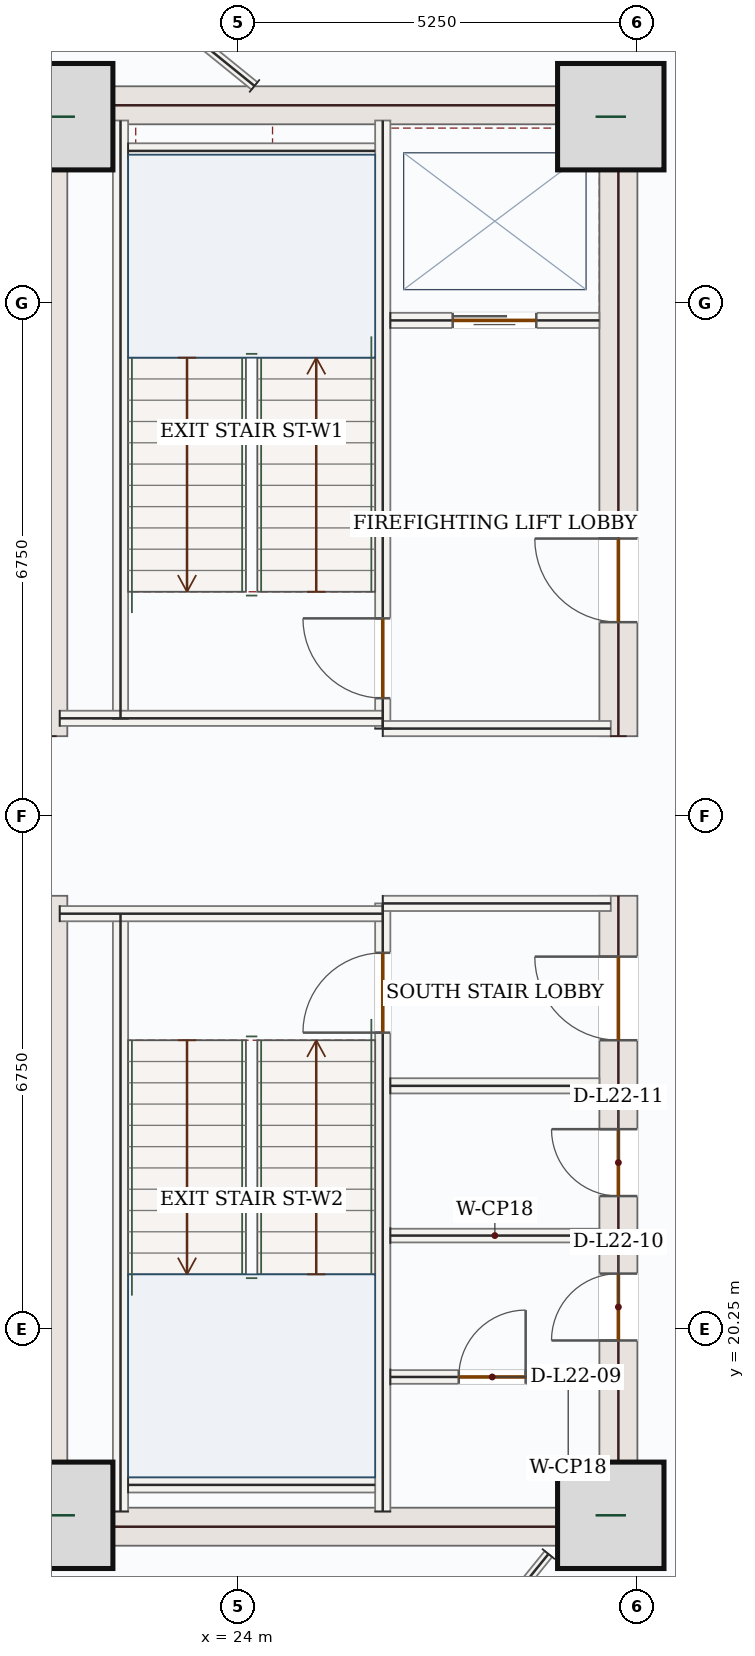
"""IFC4 building model, lengths in metres.
Left out: names, types, materials, properties, quantities, classifications, styles, units other than length and angle.
Written with IfcOpenShell. Run it as: python <this file> out.ifc"""

import sys

from ifc_helpers import new_model, si_unit, direction, frame, frame_2d, origin, origin_2d, place, context, subcontext, project, spatial, rectangle, extrude, source, transform, mapped, element, fill, save


model = new_model("IFC4")
c1 = context("Model", 3, precision=1e-05, world=origin(), true_north=direction((0.0, 1.0)))
c2 = subcontext(c1, "Body", "Model", "MODEL_VIEW")
j1 = project(units=[si_unit("LENGTHUNIT", "METRE"), si_unit("PLANEANGLEUNIT", "RADIAN")], contexts=[c1])
p1 = place(None, origin())
s1 = spatial("IfcSite", under=j1, at=p1, CompositionType="ELEMENT")
p2 = place(p1, origin())
s2 = spatial("IfcBuilding", under=s1, at=p2, CompositionType="ELEMENT")
p3 = place(p2, frame((0.0, 0.0, 100.5)))
s3 = spatial("IfcBuildingStorey", under=s2, at=p3, CompositionType="ELEMENT", Elevation=100.5)
m1 = source(origin(), c2, "Body", "SweptSolid", [
    extrude(rectangle(XDim=8.55, YDim=0.5, at=frame_2d((4.275, 0.0))), origin(), (0.0, 0.0, 1.0), 3.95),
])
for number, where, z_axis, x_axis in (
    (1, (21.5, 17.4, 0.0), (0.0, 0.0, 1.0), (0.0, 1.0, 0.0)),
    (2, (21.5, 28.05, 0.0), (0.0, 0.0, 1.0), (0.0, 1.0, 0.0)),
):
    element("IfcWall", number, at=place(p3, frame(where, z_axis=z_axis, x_axis=x_axis)), inside=s3, PredefinedType="SHEAR", context=c2, shape_type="MappedRepresentation", body=[
        mapped(m1, transform((0.0, 0.0, 0.0), x_axis=(1.0, 0.0, 0.0), y_axis=(0.0, 1.0, 0.0), z_axis=(0.0, 0.0, 1.0), scale=1.0)),
    ])
p4 = place(p3, frame((29.0, 17.4, 0.0), z_axis=(0.0, 0.0, 1.0), x_axis=(0.0, 1.0, 0.0)))
e3 = element("IfcWall", 3, at=p4, inside=s3, PredefinedType="SHEAR", context=c2, shape_type="SweptSolid", body=[
    extrude(rectangle(XDim=8.55, YDim=0.5, at=frame_2d((4.275, 0.0))), origin(), (0.0, 0.0, 1.0), 3.95),
])
p5 = place(p4, frame((6.65, 0.0, 0.0)))
e4 = element("IfcOpeningElement", 4, at=p5, cuts=e3, PredefinedType="OPENING", context=c2, shape_type="SweptSolid", body=[
    extrude(rectangle(XDim=1.1, YDim=2.2, at=frame_2d((0.55, 1.1))), frame((0.0, 0.26, 0.0), z_axis=(0.0, -1.0, 0.0), x_axis=(1.0, 0.0, 0.0)), (0.0, 0.0, 1.0), 0.52),
])
p6 = place(p4, frame((2.7, 0.0, 0.0)))
e5 = element("IfcOpeningElement", 5, at=p6, cuts=e3, PredefinedType="OPENING", context=c2, shape_type="SweptSolid", body=[
    extrude(rectangle(XDim=0.88, YDim=2.1, at=frame_2d((0.44, 1.05))), frame((0.0, 0.26, 0.0), z_axis=(0.0, -1.0, 0.0), x_axis=(1.0, 0.0, 0.0)), (0.0, 0.0, 1.0), 0.52),
])
p7 = place(p4, frame((4.6, 0.0, 0.0)))
e6 = element("IfcOpeningElement", 6, at=p7, cuts=e3, PredefinedType="OPENING", context=c2, shape_type="SweptSolid", body=[
    extrude(rectangle(XDim=0.88, YDim=2.1, at=frame_2d((0.44, 1.05))), frame((0.0, 0.26, 0.0), z_axis=(0.0, -1.0, 0.0), x_axis=(1.0, 0.0, 0.0)), (0.0, 0.0, 1.0), 0.52),
])
p8 = place(p3, frame((29.0, 28.05, 0.0), z_axis=(0.0, 0.0, 1.0), x_axis=(0.0, 1.0, 0.0)))
e7 = element("IfcWall", 7, at=p8, inside=s3, PredefinedType="SHEAR", context=c2, shape_type="SweptSolid", body=[
    extrude(rectangle(XDim=8.55, YDim=0.5, at=frame_2d((4.275, 0.0))), origin(), (0.0, 0.0, 1.0), 3.95),
])
p9 = place(p8, frame((1.5, 0.0, 0.0)))
e8 = element("IfcOpeningElement", 8, at=p9, cuts=e7, PredefinedType="OPENING", context=c2, shape_type="SweptSolid", body=[
    extrude(rectangle(XDim=1.1, YDim=2.2, at=frame_2d((0.55, 1.1))), frame((0.0, 0.26, 0.0), z_axis=(0.0, -1.0, 0.0), x_axis=(1.0, 0.0, 0.0)), (0.0, 0.0, 1.0), 0.52),
])
m2 = source(origin(), c2, "Body", "SweptSolid", [
    extrude(rectangle(XDim=7.0, YDim=0.5, at=frame_2d((3.5, 0.0))), origin(), (0.0, 0.0, 1.0), 3.95),
])
for number, where, z_axis, x_axis in (
    (9, (21.75, 17.65, 0.0), (0.0, 0.0, 1.0), (1.0, 0.0, 0.0)),
    (10, (21.75, 36.35, 0.0), (0.0, 0.0, 1.0), (1.0, 0.0, 0.0)),
):
    element("IfcWall", number, at=place(p3, frame(where, z_axis=z_axis, x_axis=x_axis)), inside=s3, PredefinedType="SHEAR", context=c2, shape_type="MappedRepresentation", body=[
        mapped(m2, transform((0.0, 0.0, 0.0), x_axis=(1.0, 0.0, 0.0), y_axis=(0.0, 1.0, 0.0), z_axis=(0.0, 0.0, 1.0), scale=1.0)),
    ])
m3 = source(origin(), c2, "Body", "SweptSolid", [
    extrude(rectangle(XDim=1.4, YDim=1.4, at=origin_2d()), origin(), (0.0, 0.0, 1.0), 4.2),
])
for number, where, z_axis, x_axis in (
    (11, (21.65, 17.8, 0.0), (0.0, 0.0, 1.0), (1.0, 0.0, 0.0)),
    (12, (28.9, 17.8, 0.0), (0.0, 0.0, 1.0), (1.0, 0.0, 0.0)),
    (13, (21.65, 36.2, 0.0), (0.0, 0.0, 1.0), (1.0, 0.0, 0.0)),
    (14, (28.9, 36.2, 0.0), (0.0, 0.0, 1.0), (1.0, 0.0, 0.0)),
):
    element("IfcColumn", number, at=place(p3, frame(where, z_axis=z_axis, x_axis=x_axis)), inside=s3, PredefinedType="COLUMN", context=c2, shape_type="MappedRepresentation", body=[
        mapped(m3, transform((0.0, 0.0, 0.0), x_axis=(1.0, 0.0, 0.0), y_axis=(0.0, 1.0, 0.0), z_axis=(0.0, 0.0, 1.0), scale=1.0)),
    ])
p10 = place(p3, frame((18.94, 35.542, 0.0), z_axis=(0.0, 0.0, 1.0), x_axis=(0.707106781187, 0.707106781187, 0.0)))
e15 = element("IfcWall", 15, at=p10, inside=s3, PredefinedType="SOLIDWALL", context=c2, shape_type="SweptSolid", body=[
    extrude(rectangle(XDim=5.258, YDim=0.32, at=frame_2d((2.629, 0.0))), origin(), (0.0, 0.0, 1.0), 3.95),
])
p11 = place(p10, frame((1.429, 0.0, 0.85)))
e16 = element("IfcOpeningElement", 16, at=p11, cuts=e15, PredefinedType="OPENING", context=c2, shape_type="SweptSolid", body=[
    extrude(rectangle(XDim=2.4, YDim=1.8, at=frame_2d((1.2, 0.9))), frame((0.0, 0.17, 0.0), z_axis=(0.0, -1.0, 0.0), x_axis=(1.0, 0.0, 0.0)), (0.0, 0.0, 1.0), 0.34),
])
m4 = source(origin(), c2, "Body", "SweptSolid", [
    extrude(rectangle(XDim=5.258, YDim=0.32, at=frame_2d((2.629, 0.0))), origin(), (0.0, 0.0, 1.0), 3.95),
])
p12 = place(p3, frame((22.658, 14.74, 0.0), z_axis=(0.0, 0.0, 1.0), x_axis=(-0.707106781187, 0.707106781187, 0.0)))
e17 = element("IfcWall", 17, at=p12, inside=s3, PredefinedType="SOLIDWALL", context=c2, shape_type="MappedRepresentation", body=[
    mapped(m4, transform((0.0, 0.0, 0.0), x_axis=(1.0, 0.0, 0.0), y_axis=(0.0, 1.0, 0.0), z_axis=(0.0, 0.0, 1.0), scale=1.0)),
])
m5 = source(origin(), c2, "Body", "SweptSolid", [
    extrude(rectangle(XDim=7.87, YDim=0.2, at=frame_2d((3.935, 0.0))), origin(), (0.0, 0.0, 1.0), 3.95),
])
for number, where, z_axis, x_axis in (
    (18, (22.45, 17.85, 0.0), (0.0, 0.0, 1.0), (0.0, 1.0, 0.0)),
    (19, (22.45, 28.28, 0.0), (0.0, 0.0, 1.0), (0.0, 1.0, 0.0)),
):
    element("IfcWall", number, at=place(p3, frame(where, z_axis=z_axis, x_axis=x_axis)), inside=s3, PredefinedType="SOLIDWALL", context=c2, shape_type="MappedRepresentation", body=[
        mapped(m5, transform((0.0, 0.0, 0.0), x_axis=(1.0, 0.0, 0.0), y_axis=(0.0, 1.0, 0.0), z_axis=(0.0, 0.0, 1.0), scale=1.0)),
    ])
p13 = place(p3, frame((25.9, 17.85, 0.0), z_axis=(0.0, 0.0, 1.0), x_axis=(0.0, 1.0, 0.0)))
e20 = element("IfcWall", 20, at=p13, inside=s3, PredefinedType="SOLIDWALL", context=c2, shape_type="SweptSolid", body=[
    extrude(rectangle(XDim=8.0, YDim=0.2, at=frame_2d((4.0, 0.0))), origin(), (0.0, 0.0, 1.0), 3.95),
])
p14 = place(p13, frame((6.3, 0.0, 0.0)))
e21 = element("IfcOpeningElement", 21, at=p14, cuts=e20, PredefinedType="OPENING", context=c2, shape_type="SweptSolid", body=[
    extrude(rectangle(XDim=1.05, YDim=2.15, at=frame_2d((0.525, 1.075))), frame((0.0, 0.11, 0.0), z_axis=(0.0, -1.0, 0.0), x_axis=(1.0, 0.0, 0.0)), (0.0, 0.0, 1.0), 0.22),
])
p15 = place(p3, frame((25.9, 28.15, 0.0), z_axis=(0.0, 0.0, 1.0), x_axis=(0.0, 1.0, 0.0)))
e22 = element("IfcWall", 22, at=p15, inside=s3, PredefinedType="SOLIDWALL", context=c2, shape_type="SweptSolid", body=[
    extrude(rectangle(XDim=8.0, YDim=0.2, at=frame_2d((4.0, 0.0))), origin(), (0.0, 0.0, 1.0), 3.95),
])
p16 = place(p15, frame((0.4, 0.0, 0.0)))
e23 = element("IfcOpeningElement", 23, at=p16, cuts=e22, PredefinedType="OPENING", context=c2, shape_type="SweptSolid", body=[
    extrude(rectangle(XDim=1.05, YDim=2.15, at=frame_2d((0.525, 1.075))), frame((0.0, 0.11, 0.0), z_axis=(0.0, -1.0, 0.0), x_axis=(1.0, 0.0, 0.0)), (0.0, 0.0, 1.0), 0.22),
])
m6 = source(origin(), c2, "Body", "SweptSolid", [
    extrude(rectangle(XDim=4.25, YDim=0.2, at=frame_2d((2.125, 0.0))), origin(), (0.0, 0.0, 1.0), 3.95),
])
p17 = place(p3, frame((21.65, 25.715, 0.0), z_axis=(0.0, 0.0, 1.0), x_axis=(1.0, 0.0, 0.0)))
e24 = element("IfcWall", 24, at=p17, inside=s3, PredefinedType="SOLIDWALL", context=c2, shape_type="MappedRepresentation", body=[
    mapped(m6, transform((0.0, 0.0, 0.0), x_axis=(1.0, 0.0, 0.0), y_axis=(0.0, 1.0, 0.0), z_axis=(0.0, 0.0, 1.0), scale=1.0)),
])
m7 = source(origin(), c2, "Body", "SweptSolid", [
    extrude(rectangle(XDim=3.0, YDim=0.2, at=frame_2d((1.5, 0.0))), origin(), (0.0, 0.0, 1.0), 3.95),
])
p18 = place(p3, frame((25.9, 25.85, 0.0), z_axis=(0.0, 0.0, 1.0), x_axis=(1.0, 0.0, 0.0)))
e25 = element("IfcWall", 25, at=p18, inside=s3, PredefinedType="SOLIDWALL", context=c2, shape_type="MappedRepresentation", body=[
    mapped(m7, transform((0.0, 0.0, 0.0), x_axis=(1.0, 0.0, 0.0), y_axis=(0.0, 1.0, 0.0), z_axis=(0.0, 0.0, 1.0), scale=1.0)),
])
p19 = place(p3, frame((21.65, 28.285, 0.0), z_axis=(0.0, 0.0, 1.0), x_axis=(1.0, 0.0, 0.0)))
e26 = element("IfcWall", 26, at=p19, inside=s3, PredefinedType="SOLIDWALL", context=c2, shape_type="MappedRepresentation", body=[
    mapped(m6, transform((0.0, 0.0, 0.0), x_axis=(1.0, 0.0, 0.0), y_axis=(0.0, 1.0, 0.0), z_axis=(0.0, 0.0, 1.0), scale=1.0)),
])
p20 = place(p3, frame((25.9, 28.15, 0.0), z_axis=(0.0, 0.0, 1.0), x_axis=(1.0, 0.0, 0.0)))
e27 = element("IfcWall", 27, at=p20, inside=s3, PredefinedType="SOLIDWALL", context=c2, shape_type="MappedRepresentation", body=[
    mapped(m7, transform((0.0, 0.0, 0.0), x_axis=(1.0, 0.0, 0.0), y_axis=(0.0, 1.0, 0.0), z_axis=(0.0, 0.0, 1.0), scale=1.0)),
])
m8 = source(origin(), c2, "Body", "SweptSolid", [
    extrude(rectangle(XDim=3.25, YDim=0.2, at=frame_2d((1.625, 0.0))), origin(), (0.0, 0.0, 1.0), 3.95),
])
for number, where, z_axis, x_axis in (
    (28, (22.55, 35.75, 0.0), (0.0, 0.0, 1.0), (1.0, 0.0, 0.0)),
    (29, (22.55, 18.2, 0.0), (0.0, 0.0, 1.0), (1.0, 0.0, 0.0)),
):
    element("IfcWall", number, at=place(p3, frame(where, z_axis=z_axis, x_axis=x_axis)), inside=s3, PredefinedType="SOLIDWALL", context=c2, shape_type="MappedRepresentation", body=[
        mapped(m8, transform((0.0, 0.0, 0.0), x_axis=(1.0, 0.0, 0.0), y_axis=(0.0, 1.0, 0.0), z_axis=(0.0, 0.0, 1.0), scale=1.0)),
    ])
p21 = place(p3, frame((26.0, 33.52, 0.0), z_axis=(0.0, 0.0, 1.0), x_axis=(1.0, 0.0, 0.0)))
e30 = element("IfcWall", 30, at=p21, inside=s3, PredefinedType="SOLIDWALL", context=c2, shape_type="SweptSolid", body=[
    extrude(rectangle(XDim=2.75, YDim=0.2, at=frame_2d((1.375, 0.0))), origin(), (0.0, 0.0, 1.0), 3.95),
])
p22 = place(p21, frame((0.82, 0.0, 0.0)))
e31 = element("IfcOpeningElement", 31, at=p22, cuts=e30, PredefinedType="OPENING", context=c2, shape_type="SweptSolid", body=[
    extrude(rectangle(XDim=1.1, YDim=2.15, at=frame_2d((0.55, 1.075))), frame((0.0, 0.11, 0.0), z_axis=(0.0, -1.0, 0.0), x_axis=(1.0, 0.0, 0.0)), (0.0, 0.0, 1.0), 0.22),
])
m9 = source(origin(), c2, "Body", "SweptSolid", [
    extrude(rectangle(XDim=2.75, YDim=0.2, at=frame_2d((1.375, 0.0))), origin(), (0.0, 0.0, 1.0), 3.95),
])
p23 = place(p3, frame((26.0, 23.45, 0.0), z_axis=(0.0, 0.0, 1.0), x_axis=(1.0, 0.0, 0.0)))
e32 = element("IfcWall", 32, at=p23, inside=s3, PredefinedType="SOLIDWALL", context=c2, shape_type="MappedRepresentation", body=[
    mapped(m9, transform((0.0, 0.0, 0.0), x_axis=(1.0, 0.0, 0.0), y_axis=(0.0, 1.0, 0.0), z_axis=(0.0, 0.0, 1.0), scale=1.0)),
])
p24 = place(p3, frame((26.0, 19.62, 0.0), z_axis=(0.0, 0.0, 1.0), x_axis=(1.0, 0.0, 0.0)))
e33 = element("IfcWall", 33, at=p24, inside=s3, PredefinedType="PARTITIONING", context=c2, shape_type="SweptSolid", body=[
    extrude(rectangle(XDim=2.75, YDim=0.18, at=frame_2d((1.375, 0.0))), origin(), (0.0, 0.0, 1.0), 3.95),
])
p25 = place(p24, frame((0.9, 0.0, 0.0)))
e34 = element("IfcOpeningElement", 34, at=p25, cuts=e33, PredefinedType="OPENING", context=c2, shape_type="SweptSolid", body=[
    extrude(rectangle(XDim=0.88, YDim=2.1, at=frame_2d((0.44, 1.05))), frame((0.0, 0.1, 0.0), z_axis=(0.0, -1.0, 0.0), x_axis=(1.0, 0.0, 0.0)), (0.0, 0.0, 1.0), 0.2),
])
m10 = source(origin(), c2, "Body", "SweptSolid", [
    extrude(rectangle(XDim=2.75, YDim=0.18, at=frame_2d((1.375, 0.0))), origin(), (0.0, 0.0, 1.0), 3.95),
])
p26 = place(p3, frame((26.0, 21.48, 0.0), z_axis=(0.0, 0.0, 1.0), x_axis=(1.0, 0.0, 0.0)))
e35 = element("IfcWall", 35, at=p26, inside=s3, PredefinedType="PARTITIONING", context=c2, shape_type="MappedRepresentation", body=[
    mapped(m10, transform((0.0, 0.0, 0.0), x_axis=(1.0, 0.0, 0.0), y_axis=(0.0, 1.0, 0.0), z_axis=(0.0, 0.0, 1.0), scale=1.0)),
])
m11 = source(origin(), c2, "Body", "SweptSolid", [
    extrude(rectangle(XDim=2.827, YDim=0.125, at=frame_2d((1.414, 0.0))), origin(), (0.0, 0.0, 1.0), 3.95),
])
p27 = place(p3, frame((24.213, 36.605, 0.0), z_axis=(0.0, 0.0, 1.0), x_axis=(-0.776808269954, 0.62973717671, 0.0)))
e36 = element("IfcWall", 36, at=p27, inside=s3, PredefinedType="PARTITIONING", context=c2, shape_type="MappedRepresentation", body=[
    mapped(m11, transform((0.0, 0.0, 0.0), x_axis=(1.0, 0.0, 0.0), y_axis=(0.0, 1.0, 0.0), z_axis=(0.0, 0.0, 1.0), scale=1.0)),
])
m12 = source(origin(), c2, "Body", "SweptSolid", [
    extrude(rectangle(XDim=3.072, YDim=0.125, at=frame_2d((1.536, 0.0))), origin(), (0.0, 0.0, 1.0), 3.95),
])
p28 = place(p3, frame((28.08, 17.291, 0.0), z_axis=(0.0, 0.0, 1.0), x_axis=(-0.629760486176, -0.776789373029, 0.0)))
e37 = element("IfcWall", 37, at=p28, inside=s3, PredefinedType="PARTITIONING", context=c2, shape_type="MappedRepresentation", body=[
    mapped(m12, transform((0.0, 0.0, 0.0), x_axis=(1.0, 0.0, 0.0), y_axis=(0.0, 1.0, 0.0), z_axis=(0.0, 0.0, 1.0), scale=1.0)),
])
m13 = source(origin(), c2, "Body", "SweptSolid", [
    extrude(rectangle(XDim=2.4, YDim=1.8, at=frame_2d((1.2, 0.9))), frame((0.0, 0.03, 0.0), z_axis=(0.0, -1.0, 0.0), x_axis=(1.0, 0.0, 0.0)), (0.0, 0.0, 1.0), 0.06),
])
p29 = place(p11, origin())
e38 = element("IfcWindow", 38, at=p29, inside=s3, PartitioningType="DOUBLE_PANEL_VERTICAL", PredefinedType="WINDOW", context=c2, shape_type="MappedRepresentation", body=[
    mapped(m13, transform((0.0, 0.0, 0.0), x_axis=(1.0, 0.0, 0.0), y_axis=(0.0, 1.0, 0.0), z_axis=(0.0, 0.0, 1.0), scale=1.0)),
])
fill(e16, e38)
m14 = source(origin(), c2, "Body", "SweptSolid", [
    extrude(rectangle(XDim=1.05, YDim=2.15, at=frame_2d((0.525, 1.075))), frame((0.0, 0.025, 0.0), z_axis=(0.0, -1.0, 0.0), x_axis=(1.0, 0.0, 0.0)), (0.0, 0.0, 1.0), 0.05),
])
p30 = place(p16, origin())
e39 = element("IfcDoor", 39, at=p30, inside=s3, OperationType="SINGLE_SWING_RIGHT", PredefinedType="DOOR", context=c2, shape_type="MappedRepresentation", body=[
    mapped(m14, transform((0.0, 0.0, 0.0), x_axis=(1.0, 0.0, 0.0), y_axis=(0.0, 1.0, 0.0), z_axis=(0.0, 0.0, 1.0), scale=1.0)),
])
fill(e23, e39)
p31 = place(p14, origin())
e40 = element("IfcDoor", 40, at=p31, inside=s3, OperationType="SINGLE_SWING_LEFT", PredefinedType="DOOR", context=c2, shape_type="MappedRepresentation", body=[
    mapped(m14, transform((0.0, 0.0, 0.0), x_axis=(1.0, 0.0, 0.0), y_axis=(0.0, 1.0, 0.0), z_axis=(0.0, 0.0, 1.0), scale=1.0)),
])
fill(e21, e40)
m15 = source(origin(), c2, "Body", "SweptSolid", [
    extrude(rectangle(XDim=1.1, YDim=2.15, at=frame_2d((0.55, 1.075))), frame((0.0, 0.025, 0.0), z_axis=(0.0, -1.0, 0.0), x_axis=(1.0, 0.0, 0.0)), (0.0, 0.0, 1.0), 0.05),
])
p32 = place(p22, origin())
e41 = element("IfcDoor", 41, at=p32, inside=s3, OperationType="DOUBLE_DOOR_SLIDING", PredefinedType="DOOR", context=c2, shape_type="MappedRepresentation", body=[
    mapped(m15, transform((0.0, 0.0, 0.0), x_axis=(1.0, 0.0, 0.0), y_axis=(0.0, 1.0, 0.0), z_axis=(0.0, 0.0, 1.0), scale=1.0)),
])
fill(e31, e41)
m16 = source(origin(), c2, "Body", "SweptSolid", [
    extrude(rectangle(XDim=1.1, YDim=2.2, at=frame_2d((0.55, 1.1))), frame((0.0, 0.025, 0.0), z_axis=(0.0, -1.0, 0.0), x_axis=(1.0, 0.0, 0.0)), (0.0, 0.0, 1.0), 0.05),
])
p33 = place(p9, origin())
e42 = element("IfcDoor", 42, at=p33, inside=s3, OperationType="SINGLE_SWING_RIGHT", PredefinedType="DOOR", context=c2, shape_type="MappedRepresentation", body=[
    mapped(m16, transform((0.0, 0.0, 0.0), x_axis=(1.0, 0.0, 0.0), y_axis=(0.0, 1.0, 0.0), z_axis=(0.0, 0.0, 1.0), scale=1.0)),
])
fill(e8, e42)
p34 = place(p5, origin())
e43 = element("IfcDoor", 43, at=p34, inside=s3, OperationType="SINGLE_SWING_RIGHT", PredefinedType="DOOR", context=c2, shape_type="MappedRepresentation", body=[
    mapped(m16, transform((0.0, 0.0, 0.0), x_axis=(1.0, 0.0, 0.0), y_axis=(0.0, 1.0, 0.0), z_axis=(0.0, 0.0, 1.0), scale=1.0)),
])
fill(e4, e43)
m17 = source(origin(), c2, "Body", "SweptSolid", [
    extrude(rectangle(XDim=0.88, YDim=2.1, at=frame_2d((0.44, 1.05))), frame((0.0, 0.025, 0.0), z_axis=(0.0, -1.0, 0.0), x_axis=(1.0, 0.0, 0.0)), (0.0, 0.0, 1.0), 0.05),
])
p35 = place(p25, origin())
e44 = element("IfcDoor", 44, at=p35, inside=s3, OperationType="SINGLE_SWING_RIGHT", PredefinedType="DOOR", context=c2, shape_type="MappedRepresentation", body=[
    mapped(m17, transform((0.0, 0.0, 0.0), x_axis=(1.0, 0.0, 0.0), y_axis=(0.0, 1.0, 0.0), z_axis=(0.0, 0.0, 1.0), scale=1.0)),
])
fill(e34, e44)
p36 = place(p6, origin())
e45 = element("IfcDoor", 45, at=p36, inside=s3, OperationType="SINGLE_SWING_LEFT", PredefinedType="DOOR", context=c2, shape_type="MappedRepresentation", body=[
    mapped(m17, transform((0.0, 0.0, 0.0), x_axis=(1.0, 0.0, 0.0), y_axis=(0.0, 1.0, 0.0), z_axis=(0.0, 0.0, 1.0), scale=1.0)),
])
fill(e5, e45)
p37 = place(p7, origin())
e46 = element("IfcDoor", 46, at=p37, inside=s3, OperationType="SINGLE_SWING_RIGHT", PredefinedType="DOOR", context=c2, shape_type="MappedRepresentation", body=[
    mapped(m17, transform((0.0, 0.0, 0.0), x_axis=(1.0, 0.0, 0.0), y_axis=(0.0, 1.0, 0.0), z_axis=(0.0, 0.0, 1.0), scale=1.0)),
])
fill(e6, e46)
save(model, sys.argv[1])
